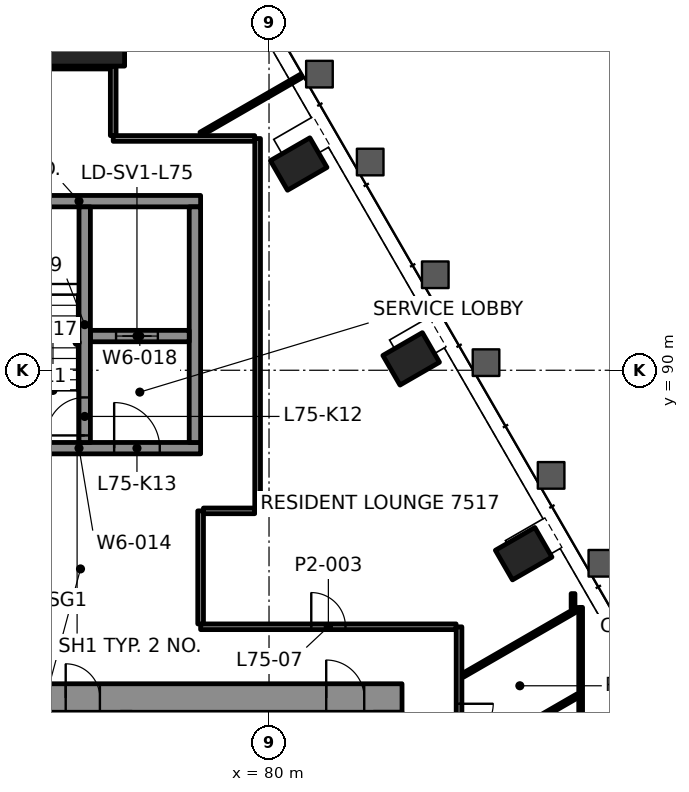
"""IFC4 building model, lengths in metres.
Left out: names, types, materials, properties, quantities, classifications, styles, units other than length and angle.
Written with IfcOpenShell. Run it as: python <this file> out.ifc"""

import sys

from ifc_helpers import new_model, si_unit, direction, frame, frame_2d, origin, origin_2d, place, context, subcontext, project, spatial, rectangle, hollow_rectangle, extrude, element, fill, save


model = new_model("IFC4")
c1 = context("Model", 3, precision=1e-05, world=origin(), true_north=direction((0.0, 1.0)))
c2 = subcontext(c1, "Body", "Model", "MODEL_VIEW")
j1 = project(units=[si_unit("LENGTHUNIT", "METRE"), si_unit("PLANEANGLEUNIT", "RADIAN")], contexts=[c1])
p1 = place(None, origin())
s1 = spatial("IfcSite", under=j1, at=p1, CompositionType="ELEMENT")
p2 = place(p1, origin())
s2 = spatial("IfcBuilding", under=s1, at=p2, CompositionType="ELEMENT")
p3 = place(p2, frame((0.0, 0.0, 309.1)))
s3 = spatial("IfcBuildingStorey", under=s2, at=p3, CompositionType="ELEMENT", Elevation=309.1)
p4 = place(p3, frame((75.0, 99.204, 0.0), z_axis=(0.0, 0.0, 1.0), x_axis=(-1.0, 0.0, 0.0)))
e1 = element("IfcColumn", 1, at=p4, inside=s3, PredefinedType="COLUMN", context=c2, shape_type="SweptSolid", body=[
    extrude(rectangle(XDim=2.4, YDim=2.4, at=origin_2d()), origin(), (0.0, 0.0, 1.0), 3.5),
])
for number, where, z_axis, x_axis in (
    (2, (86.701, 85.173, -0.0), (0.0, 0.0, 1.0), (-0.5, 0.866, 0.0)),
    (3, (83.74, 90.3, -0.0), (0.0, 0.0, 1.0), (-0.5, 0.866, 0.0)),
    (4, (80.781, 95.427, -0.0), (0.0, 0.0, 1.0), (-0.5, 0.866, 0.0)),
):
    element("IfcColumn", number, at=place(p3, frame(where, z_axis=z_axis, x_axis=x_axis)), inside=s3, PredefinedType="COLUMN", context=c2, shape_type="SweptSolid", body=[
        extrude(hollow_rectangle(XDim=0.9, YDim=1.2, WallThickness=0.06, at=origin_2d()), origin(), (0.0, 0.0, 1.0), 3.5),
    ])
p5 = place(p3, frame((66.5, 81.375, 0.0), z_axis=(0.0, 0.0, 1.0), x_axis=(1.0, 0.0, 0.0)))
e5 = element("IfcWall", 5, at=p5, inside=s3, PredefinedType="SHEAR", context=c2, shape_type="SweptSolid", body=[
    extrude(rectangle(XDim=17.0, YDim=0.75, at=frame_2d((8.5, 0.0))), origin(), (0.0, 0.0, 1.0), 3.3),
])
p6 = place(p5, frame((1.195, 0.0, 0.0)))
e6 = element("IfcOpeningElement", 6, at=p6, cuts=e5, PredefinedType="OPENING", context=c2, shape_type="SweptSolid", body=[
    extrude(rectangle(XDim=1.0, YDim=2.1, at=frame_2d((0.5, 1.05))), frame((0.0, 0.385, 0.0), z_axis=(0.0, -1.0, 0.0), x_axis=(1.0, 0.0, 0.0)), (0.0, 0.0, 1.0), 0.77),
])
p7 = place(p5, frame((15.005, 0.0, 0.0)))
e7 = element("IfcOpeningElement", 7, at=p7, cuts=e5, PredefinedType="OPENING", context=c2, shape_type="SweptSolid", body=[
    extrude(rectangle(XDim=1.0, YDim=2.1, at=frame_2d((0.5, 1.05))), frame((0.0, 0.385, 0.0), z_axis=(0.0, -1.0, 0.0), x_axis=(1.0, 0.0, 0.0)), (0.0, 0.0, 1.0), 0.77),
])
p8 = place(p5, frame((8.15, 0.0, 0.0)))
e8 = element("IfcOpeningElement", 8, at=p8, cuts=e5, PredefinedType="OPENING", context=c2, shape_type="SweptSolid", body=[
    extrude(rectangle(XDim=0.9, YDim=2.1, at=frame_2d((0.45, 1.05))), frame((0.0, 0.385, 0.0), z_axis=(0.0, -1.0, 0.0), x_axis=(1.0, 0.0, 0.0)), (0.0, 0.0, 1.0), 0.77),
])
p9 = place(p3, frame((83.125, 69.0, 0.0), z_axis=(0.0, 0.0, 1.0), x_axis=(0.0, 1.0, 0.0)))
e9 = element("IfcWall", 9, at=p9, inside=s3, PredefinedType="SHEAR", context=c2, shape_type="SweptSolid", body=[
    extrude(rectangle(XDim=12.0, YDim=0.75, at=frame_2d((6.0, 0.0))), origin(), (0.0, 0.0, 1.0), 3.3),
])
p10 = place(p9, frame((3.4, 0.0, 0.0)))
e10 = element("IfcOpeningElement", 10, at=p10, cuts=e9, PredefinedType="OPENING", context=c2, shape_type="SweptSolid", body=[
    extrude(rectangle(XDim=1.8, YDim=2.1, at=frame_2d((0.9, 1.05))), frame((0.0, 0.385, 0.0), z_axis=(0.0, -1.0, 0.0), x_axis=(1.0, 0.0, 0.0)), (0.0, 0.0, 1.0), 0.77),
])
p11 = place(p3, frame((76.24, 77.9, 0.0), z_axis=(0.0, 0.0, 1.0), x_axis=(0.0, 1.0, 0.0)))
e11 = element("IfcWall", 11, at=p11, inside=s3, PredefinedType="SHEAR", context=c2, shape_type="SweptSolid", body=[
    extrude(rectangle(XDim=3.1, YDim=0.3, at=frame_2d((1.55, 0.0))), origin(), (0.0, 0.0, 1.0), 3.3),
])
p12 = place(p3, frame((71.8, 87.95, 0.0), z_axis=(0.0, 0.0, 1.0), x_axis=(1.0, 0.0, 0.0)))
e12 = element("IfcWall", 12, at=p12, inside=s3, PredefinedType="SHEAR", context=c2, shape_type="SweptSolid", body=[
    extrude(rectangle(XDim=6.4, YDim=0.3, at=frame_2d((3.2, 0.0))), origin(), (0.0, 0.0, 1.0), 3.3),
])
p13 = place(p12, frame((1.325, 0.0, 0.0)))
e13 = element("IfcOpeningElement", 13, at=p13, cuts=e12, PredefinedType="OPENING", context=c2, shape_type="SweptSolid", body=[
    extrude(rectangle(XDim=1.0, YDim=2.1, at=frame_2d((0.5, 1.05))), frame((0.0, 0.16, 0.0), z_axis=(0.0, -1.0, 0.0), x_axis=(1.0, 0.0, 0.0)), (0.0, 0.0, 1.0), 0.32),
])
p14 = place(p12, frame((4.125, 0.0, 0.0)))
e14 = element("IfcOpeningElement", 14, at=p14, cuts=e12, PredefinedType="OPENING", context=c2, shape_type="SweptSolid", body=[
    extrude(rectangle(XDim=1.2, YDim=2.1, at=frame_2d((0.6, 1.05))), frame((0.0, 0.16, 0.0), z_axis=(0.0, -1.0, 0.0), x_axis=(1.0, 0.0, 0.0)), (0.0, 0.0, 1.0), 0.32),
])
p15 = place(p3, frame((71.8, 94.45, 0.0), z_axis=(0.0, 0.0, 1.0), x_axis=(1.0, 0.0, 0.0)))
e15 = element("IfcWall", 15, at=p15, inside=s3, PredefinedType="SHEAR", context=c2, shape_type="SweptSolid", body=[
    extrude(rectangle(XDim=6.4, YDim=0.3, at=frame_2d((3.2, 0.0))), origin(), (0.0, 0.0, 1.0), 3.3),
])
p16 = place(p3, frame((78.05, 88.1, 0.0), z_axis=(0.0, 0.0, 1.0), x_axis=(0.0, 1.0, 0.0)))
e16 = element("IfcWall", 16, at=p16, inside=s3, PredefinedType="SHEAR", context=c2, shape_type="SweptSolid", body=[
    extrude(rectangle(XDim=6.2, YDim=0.3, at=frame_2d((3.1, 0.0))), origin(), (0.0, 0.0, 1.0), 3.3),
])
p17 = place(p3, frame((75.3, 90.9, 0.0), z_axis=(0.0, 0.0, 1.0), x_axis=(1.0, 0.0, 0.0)))
e17 = element("IfcWall", 17, at=p17, inside=s3, PredefinedType="SHEAR", context=c2, shape_type="SweptSolid", body=[
    extrude(rectangle(XDim=2.6, YDim=0.3, at=frame_2d((1.3, 0.0))), origin(), (0.0, 0.0, 1.0), 3.3),
])
p18 = place(p17, frame((0.675, 0.0, 0.0)))
e18 = element("IfcOpeningElement", 18, at=p18, cuts=e17, PredefinedType="OPENING", context=c2, shape_type="SweptSolid", body=[
    extrude(rectangle(XDim=1.1, YDim=2.1, at=frame_2d((0.55, 1.05))), frame((0.0, 0.16, 0.0), z_axis=(0.0, -1.0, 0.0), x_axis=(1.0, 0.0, 0.0)), (0.0, 0.0, 1.0), 0.32),
])
p19 = place(p3, frame((75.15, 88.1, 0.0), z_axis=(0.0, 0.0, 1.0), x_axis=(0.0, 1.0, 0.0)))
e19 = element("IfcWall", 19, at=p19, inside=s3, PredefinedType="SHEAR", context=c2, shape_type="SweptSolid", body=[
    extrude(rectangle(XDim=6.2, YDim=0.3, at=frame_2d((3.1, 0.0))), origin(), (0.0, 0.0, 1.0), 3.3),
])
p20 = place(p19, frame((0.185, 0.0, 0.0)))
e20 = element("IfcOpeningElement", 20, at=p20, cuts=e19, PredefinedType="OPENING", context=c2, shape_type="SweptSolid", body=[
    extrude(rectangle(XDim=1.0, YDim=2.1, at=frame_2d((0.5, 1.05))), frame((0.0, 0.16, 0.0), z_axis=(0.0, -1.0, 0.0), x_axis=(1.0, 0.0, 0.0)), (0.0, 0.0, 1.0), 0.32),
])
p21 = place(p3, frame((78.2, 83.25, 0.0), z_axis=(0.0, 0.0, 1.0), x_axis=(1.0, 0.0, 0.0)))
e21 = element("IfcWall", 21, at=p21, inside=s3, PredefinedType="PARTITIONING", context=c2, shape_type="SweptSolid", body=[
    extrude(rectangle(XDim=6.723, YDim=0.15, at=frame_2d((3.362, 0.0))), origin(), (0.0, 0.0, 1.0), 2.7),
])
p22 = place(p21, frame((2.911, 0.0, 0.0)))
e22 = element("IfcOpeningElement", 22, at=p22, cuts=e21, PredefinedType="OPENING", context=c2, shape_type="SweptSolid", body=[
    extrude(rectangle(XDim=0.9, YDim=2.1, at=frame_2d((0.45, 1.05))), frame((0.0, 0.085, 0.0), z_axis=(0.0, -1.0, 0.0), x_axis=(1.0, 0.0, 0.0)), (0.0, 0.0, 1.0), 0.17),
])
p23 = place(p3, frame((78.275, 86.3, 0.0), z_axis=(0.0, 0.0, 1.0), x_axis=(1.0, 0.0, 0.0)))
e23 = element("IfcWall", 23, at=p23, inside=s3, PredefinedType="PARTITIONING", context=c2, shape_type="SweptSolid", body=[
    extrude(rectangle(XDim=1.348, YDim=0.15, at=frame_2d((0.674, 0.0))), origin(), (0.0, 0.0, 1.0), 2.7),
])
p24 = place(p3, frame((75.9, 96.1, 0.0), z_axis=(0.0, 0.0, 1.0), x_axis=(1.0, 0.0, 0.0)))
e24 = element("IfcWall", 24, at=p24, inside=s3, PredefinedType="PARTITIONING", context=c2, shape_type="SweptSolid", body=[
    extrude(rectangle(XDim=3.723, YDim=0.15, at=frame_2d((1.862, 0.0))), origin(), (0.0, 0.0, 1.0), 2.7),
])
p25 = place(p3, frame((74.176, 98.004, 0.0), z_axis=(0.0, 0.0, 1.0), x_axis=(1.0, 0.0, 0.0)))
e25 = element("IfcWall", 25, at=p25, inside=s3, PredefinedType="PARTITIONING", context=c2, shape_type="SweptSolid", body=[
    extrude(rectangle(XDim=1.649, YDim=0.15, at=frame_2d((0.824, 0.0))), origin(), (0.0, 0.0, 1.0), 2.697),
])
p26 = place(p3, frame((85.101, 79.692, 0.0), z_axis=(0.0, 0.0, 1.0), x_axis=(0.866017863565, 0.500013059815, 0.0)))
e26 = element("IfcWall", 26, at=p26, inside=s3, PredefinedType="PARTITIONING", context=c2, shape_type="SweptSolid", body=[
    extrude(rectangle(XDim=3.491, YDim=0.1, at=frame_2d((1.745, 0.0))), origin(), (0.0, 0.0, 1.0), 2.7),
])
p27 = place(p3, frame((85.101, 81.971, 0.0), z_axis=(0.0, 0.0, 1.0), x_axis=(0.866017863565, 0.500013059815, 0.0)))
e27 = element("IfcWall", 27, at=p27, inside=s3, PredefinedType="PARTITIONING", context=c2, shape_type="SweptSolid", body=[
    extrude(rectangle(XDim=3.491, YDim=0.1, at=frame_2d((1.745, 0.0))), origin(), (0.0, 0.0, 1.0), 2.688),
])
p28 = place(p3, frame((78.208, 96.22, 0.0), z_axis=(0.0, 0.0, 1.0), x_axis=(0.866004412891, 0.500036355531, 0.0)))
e28 = element("IfcWall", 28, at=p28, inside=s3, PredefinedType="PARTITIONING", context=c2, shape_type="SweptSolid", body=[
    extrude(rectangle(XDim=3.052, YDim=0.1, at=frame_2d((1.526, 0.0))), origin(), (0.0, 0.0, 1.0), 2.7),
])
p29 = place(p3, frame((88.2, 79.203, 0.0), z_axis=(0.0, 0.0, 1.0), x_axis=(0.0, 1.0, 0.0)))
e29 = element("IfcWall", 29, at=p29, inside=s3, PredefinedType="PARTITIONING", context=c2, shape_type="SweptSolid", body=[
    extrude(rectangle(XDim=4.557, YDim=0.1, at=frame_2d((2.279, 0.0))), origin(), (0.0, 0.0, 1.0), 2.688),
])
p30 = place(p3, frame((88.0, 83.733, 0.0), z_axis=(0.0, 0.0, 1.0), x_axis=(0.0, 1.0, 0.0)))
e30 = element("IfcWall", 30, at=p30, inside=s3, PredefinedType="PARTITIONING", context=c2, shape_type="SweptSolid", body=[
    extrude(rectangle(XDim=0.39, YDim=0.1, at=frame_2d((0.195, 0.0))), origin(), (0.0, 0.0, 1.0), 2.7),
])
p31 = place(p3, frame((85.0, 83.248, 0.0), z_axis=(0.0, 0.0, 1.0), x_axis=(0.0, -1.0, 0.0)))
e31 = element("IfcWall", 31, at=p31, inside=s3, PredefinedType="PARTITIONING", context=c2, shape_type="SweptSolid", body=[
    extrude(rectangle(XDim=12.982, YDim=0.15, at=frame_2d((6.491, 0.0))), origin(), (0.0, 0.0, 1.0), 2.7),
])
p32 = place(p31, frame((2.024, 0.0, 0.0)))
e32 = element("IfcOpeningElement", 32, at=p32, cuts=e31, PredefinedType="OPENING", context=c2, shape_type="SweptSolid", body=[
    extrude(rectangle(XDim=0.9, YDim=2.1, at=frame_2d((0.45, 1.05))), frame((0.0, 0.085, 0.0), z_axis=(0.0, -1.0, 0.0), x_axis=(1.0, 0.0, 0.0)), (0.0, 0.0, 1.0), 0.17),
])
p33 = place(p31, frame((4.303, 0.0, 0.0)))
e33 = element("IfcOpeningElement", 33, at=p33, cuts=e31, PredefinedType="OPENING", context=c2, shape_type="SweptSolid", body=[
    extrude(rectangle(XDim=0.9, YDim=2.1, at=frame_2d((0.45, 1.05))), frame((0.0, 0.085, 0.0), z_axis=(0.0, -1.0, 0.0), x_axis=(1.0, 0.0, 0.0)), (0.0, 0.0, 1.0), 0.17),
])
p34 = place(p31, frame((8.836, 0.0, 0.0)))
e34 = element("IfcOpeningElement", 34, at=p34, cuts=e31, PredefinedType="OPENING", context=c2, shape_type="SweptSolid", body=[
    extrude(rectangle(XDim=1.0, YDim=2.1, at=frame_2d((0.5, 1.05))), frame((0.0, 0.085, 0.0), z_axis=(0.0, -1.0, 0.0), x_axis=(1.0, 0.0, 0.0)), (0.0, 0.0, 1.0), 0.17),
])
p35 = place(p3, frame((79.7, 86.302, 0.0), z_axis=(0.0, 0.0, 1.0), x_axis=(0.0, 1.0, 0.0)))
e35 = element("IfcWall", 35, at=p35, inside=s3, PredefinedType="PARTITIONING", context=c2, shape_type="SweptSolid", body=[
    extrude(rectangle(XDim=9.796, YDim=0.15, at=frame_2d((4.898, 0.0))), origin(), (0.0, 0.0, 1.0), 2.7),
])
p36 = place(p3, frame((78.2, 83.325, 0.0), z_axis=(0.0, 0.0, 1.0), x_axis=(0.0, 1.0, 0.0)))
e36 = element("IfcWall", 36, at=p36, inside=s3, PredefinedType="PARTITIONING", context=c2, shape_type="SweptSolid", body=[
    extrude(rectangle(XDim=2.975, YDim=0.15, at=frame_2d((1.488, 0.0))), origin(), (0.0, 0.0, 1.0), 2.7),
])
p37 = place(p3, frame((75.9, 96.175, 0.0), z_axis=(0.0, 0.0, 1.0), x_axis=(0.0, 1.0, 0.0)))
e37 = element("IfcWall", 37, at=p37, inside=s3, PredefinedType="PARTITIONING", context=c2, shape_type="SweptSolid", body=[
    extrude(rectangle(XDim=1.828, YDim=0.15, at=frame_2d((0.914, 0.0))), origin(), (0.0, 0.0, 1.0), 2.7),
])
p38 = place(p22, origin())
e38 = element("IfcDoor", 38, at=p38, inside=s3, OperationType="SINGLE_SWING_RIGHT", PredefinedType="DOOR", context=c2, shape_type="SweptSolid", body=[
    extrude(rectangle(XDim=0.9, YDim=2.1, at=frame_2d((0.45, 1.05))), frame((0.0, 0.025, 0.0), z_axis=(0.0, -1.0, 0.0), x_axis=(1.0, 0.0, 0.0)), (0.0, 0.0, 1.0), 0.05),
])
fill(e22, e38)
p39 = place(p32, origin())
e39 = element("IfcDoor", 39, at=p39, inside=s3, OperationType="SINGLE_SWING_RIGHT", PredefinedType="DOOR", context=c2, shape_type="SweptSolid", body=[
    extrude(rectangle(XDim=0.9, YDim=2.1, at=frame_2d((0.45, 1.05))), frame((0.0, 0.025, 0.0), z_axis=(0.0, -1.0, 0.0), x_axis=(1.0, 0.0, 0.0)), (0.0, 0.0, 1.0), 0.05),
])
fill(e32, e39)
p40 = place(p18, origin())
e40 = element("IfcDoor", 40, at=p40, inside=s3, OperationType="DOUBLE_DOOR_SLIDING", PredefinedType="DOOR", context=c2, shape_type="SweptSolid", body=[
    extrude(rectangle(XDim=1.1, YDim=2.1, at=frame_2d((0.55, 1.05))), frame((0.0, 0.025, 0.0), z_axis=(0.0, -1.0, 0.0), x_axis=(1.0, 0.0, 0.0)), (0.0, 0.0, 1.0), 0.05),
])
fill(e18, e40)
p41 = place(p7, origin())
e41 = element("IfcDoor", 41, at=p41, inside=s3, OperationType="SINGLE_SWING_LEFT", PredefinedType="DOOR", context=c2, shape_type="SweptSolid", body=[
    extrude(rectangle(XDim=1.0, YDim=2.1, at=frame_2d((0.5, 1.05))), frame((0.0, 0.095, 0.0), z_axis=(0.0, -1.0, 0.0), x_axis=(1.0, 0.0, 0.0)), (0.0, 0.0, 1.0), 0.19),
])
fill(e7, e41)
p42 = place(p20, origin())
e42 = element("IfcDoor", 42, at=p42, inside=s3, OperationType="SINGLE_SWING_LEFT", PredefinedType="DOOR", context=c2, shape_type="SweptSolid", body=[
    extrude(rectangle(XDim=1.0, YDim=2.1, at=frame_2d((0.5, 1.05))), frame((0.0, 0.025, 0.0), z_axis=(0.0, -1.0, 0.0), x_axis=(1.0, 0.0, 0.0)), (0.0, 0.0, 1.0), 0.05),
])
fill(e20, e42)
p43 = place(p14, origin())
e43 = element("IfcDoor", 43, at=p43, inside=s3, OperationType="SINGLE_SWING_RIGHT", PredefinedType="DOOR", context=c2, shape_type="SweptSolid", body=[
    extrude(rectangle(XDim=1.2, YDim=2.1, at=frame_2d((0.6, 1.05))), frame((0.0, 0.025, 0.0), z_axis=(0.0, -1.0, 0.0), x_axis=(1.0, 0.0, 0.0)), (0.0, 0.0, 1.0), 0.05),
])
fill(e14, e43)
p44 = place(p8, origin())
e44 = element("IfcDoor", 44, at=p44, inside=s3, OperationType="SINGLE_SWING_RIGHT", PredefinedType="DOOR", context=c2, shape_type="SweptSolid", body=[
    extrude(rectangle(XDim=0.9, YDim=2.1, at=frame_2d((0.45, 1.05))), frame((0.0, 0.095, 0.0), z_axis=(0.0, -1.0, 0.0), x_axis=(1.0, 0.0, 0.0)), (0.0, 0.0, 1.0), 0.19),
])
fill(e8, e44)
save(model, sys.argv[1])
